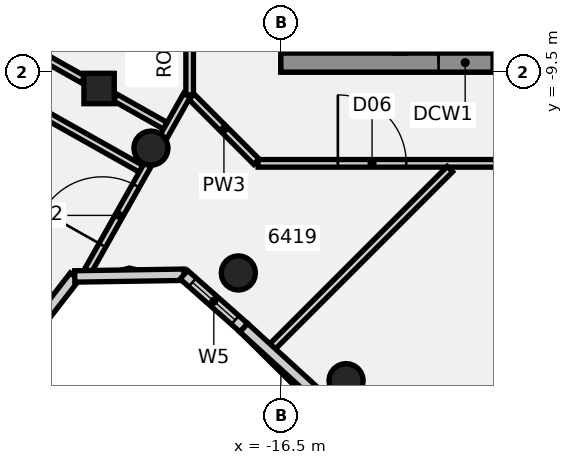
"""IFC4 building model, lengths in metres.
Left out: names, types, materials, properties, quantities, classifications, styles, units other than length and angle.
Written with IfcOpenShell. Run it as: python <this file> out.ifc"""

import sys

from ifc_helpers import new_model, si_unit, direction, frame, frame_2d, origin, origin_2d, place, context, subcontext, project, spatial, polyline, rectangle, circle, outline, extrude, element, fill, save


model = new_model("IFC4")
c1 = context("Model", 3, precision=1e-05, world=origin(), true_north=direction((0.0, 1.0)))
c2 = subcontext(c1, "Body", "Model", "MODEL_VIEW")
j1 = project(units=[si_unit("LENGTHUNIT", "METRE"), si_unit("PLANEANGLEUNIT", "RADIAN")], contexts=[c1])
p1 = place(None, origin())
s1 = spatial("IfcSite", under=j1, at=p1, CompositionType="ELEMENT")
p2 = place(p1, origin())
s2 = spatial("IfcBuilding", under=s1, at=p2, CompositionType="ELEMENT")
p3 = place(p2, frame((0.0, 0.0, 252.3)))
s3 = spatial("IfcBuildingStorey", under=s2, at=p3, CompositionType="ELEMENT", Elevation=252.3)
for number, where, z_axis, x_axis in (
    (1, (-19.919, -11.5, -0.18), (0.0, 0.0, 1.0), (1.0, 0.0, 0.0)),
    (2, (-17.619, -14.784, -0.18), (0.0, 0.0, 1.0), (1.0, 0.0, 0.0)),
    (3, (-14.784, -17.619, -0.18), (0.0, 0.0, 1.0), (1.0, 0.0, 0.0)),
):
    element("IfcColumn", number, at=place(p3, frame(where, z_axis=z_axis, x_axis=x_axis)), inside=s3, PredefinedType="COLUMN", context=c2, shape_type="SweptSolid", body=[
        extrude(circle(Radius=0.45, at=origin_2d()), origin(), (0.0, 0.0, 1.0), 4.54),
    ])
p4 = place(p3, frame((-21.283, -9.931, -0.165), z_axis=(0.0, 0.0, 1.0), x_axis=(0.490928082303, 0.871200102162, 0.0)))
e4 = element("IfcColumn", 4, at=p4, inside=s3, PredefinedType="COLUMN", context=c2, shape_type="SweptSolid", body=[
    extrude(rectangle(XDim=0.8, YDim=0.8, at=origin_2d()), origin(), (0.0, 0.0, 1.0), 4.415),
])
p5 = place(p3, frame((-18.854, -10.146, 0.0), z_axis=(0.0, 0.0, 1.0), x_axis=(0.707106781187, -0.707106781187, 0.0)))
e5 = element("IfcWall", 5, at=p5, inside=s3, PredefinedType="PARTITIONING", context=c2, shape_type="SweptSolid", body=[
    extrude(rectangle(XDim=2.421, YDim=0.2, at=frame_2d((1.21, 0.0))), origin(), (0.0, 0.0, 1.0), 3.66),
])
p6 = place(p3, frame((-27.723, -7.793, 0.0), z_axis=(0.0, 0.0, 1.0), x_axis=(0.871250853951, -0.490838007382, 0.0)))
e6 = element("IfcWall", 6, at=p6, inside=s3, PredefinedType="PARTITIONING", context=c2, shape_type="SweptSolid", body=[
    extrude(rectangle(XDim=8.66, YDim=0.2, at=frame_2d((4.33, 0.0))), origin(), (0.0, 0.0, 1.0), 3.65),
])
p7 = place(p3, frame((-26.711, -6.872, 0.0), z_axis=(0.0, 0.0, 1.0), x_axis=(0.871249420599, -0.490840551612, 0.0)))
e7 = element("IfcWall", 7, at=p7, inside=s3, PredefinedType="PARTITIONING", context=c2, shape_type="SweptSolid", body=[
    extrude(rectangle(XDim=5.741, YDim=0.2, at=frame_2d((2.871, 0.0))), origin(), (0.0, 0.0, 1.0), 3.65),
])
p8 = place(p3, frame((-20.857, -10.17, 0.0), z_axis=(0.0, 0.0, 1.0), x_axis=(0.871269034668, -0.490805734715, 0.0)))
e8 = element("IfcWall", 8, at=p8, inside=s3, PredefinedType="PARTITIONING", context=c2, shape_type="SweptSolid", body=[
    extrude(rectangle(XDim=1.511, YDim=0.2, at=frame_2d((0.756, 0.0))), origin(), (0.0, 0.0, 1.0), 3.66),
])
p9 = place(p3, frame((-17.1, -11.9, 0.0), z_axis=(0.0, 0.0, 1.0), x_axis=(1.0, 0.0, 0.0)))
e9 = element("IfcWall", 9, at=p9, inside=s3, PredefinedType="PARTITIONING", context=c2, shape_type="SweptSolid", body=[
    extrude(rectangle(XDim=34.145, YDim=0.2, at=frame_2d((17.073, 0.0))), origin(), (0.0, 0.0, 1.0), 3.66),
])
p10 = place(p9, frame((16.15, 0.0, 0.0)))
e10 = element("IfcOpeningElement", 10, at=p10, cuts=e9, PredefinedType="OPENING", context=c2, shape_type="SweptSolid", body=[
    extrude(rectangle(XDim=1.8, YDim=2.1, at=frame_2d((0.9, 1.05))), frame((0.0, 0.11, 0.0), z_axis=(0.0, -1.0, 0.0), x_axis=(1.0, 0.0, 0.0)), (0.0, 0.0, 1.0), 0.22),
])
p11 = place(p9, frame((7.45, 0.0, 0.0)))
e11 = element("IfcOpeningElement", 11, at=p11, cuts=e9, PredefinedType="OPENING", context=c2, shape_type="SweptSolid", body=[
    extrude(rectangle(XDim=1.8, YDim=2.1, at=frame_2d((0.9, 1.05))), frame((0.0, 0.11, 0.0), z_axis=(0.0, -1.0, 0.0), x_axis=(1.0, 0.0, 0.0)), (0.0, 0.0, 1.0), 0.22),
])
p12 = place(p9, frame((2.1, 0.0, 0.0)))
e12 = element("IfcOpeningElement", 12, at=p12, cuts=e9, PredefinedType="OPENING", context=c2, shape_type="SweptSolid", body=[
    extrude(rectangle(XDim=1.8, YDim=2.1, at=frame_2d((0.9, 1.05))), frame((0.0, 0.11, 0.0), z_axis=(0.0, -1.0, 0.0), x_axis=(1.0, 0.0, 0.0)), (0.0, 0.0, 1.0), 0.22),
])
p13 = place(p3, frame((-16.927, -16.927, 0.0), z_axis=(0.0, 0.0, 1.0), x_axis=(0.707106781187, 0.707106781187, 0.0)))
e13 = element("IfcWall", 13, at=p13, inside=s3, PredefinedType="PARTITIONING", context=c2, shape_type="SweptSolid", body=[
    extrude(rectangle(XDim=6.894, YDim=0.2, at=frame_2d((3.447, 0.0))), origin(), (0.0, 0.0, 1.0), 3.66),
])
p14 = place(p3, frame((-21.571, -14.72, 0.0), z_axis=(0.0, 0.0, 1.0), x_axis=(0.490968764071, 0.871177176415, 0.0)))
e14 = element("IfcWall", 14, at=p14, inside=s3, PredefinedType="PARTITIONING", context=c2, shape_type="SweptSolid", body=[
    extrude(rectangle(XDim=3.194, YDim=0.2, at=frame_2d((1.597, 0.0))), origin(), (0.0, 0.0, 1.0), 3.66),
])
p15 = place(p14, frame((0.764, 0.0, 0.0)))
e15 = element("IfcOpeningElement", 15, at=p15, cuts=e14, PredefinedType="OPENING", context=c2, shape_type="SweptSolid", body=[
    extrude(rectangle(XDim=1.8, YDim=2.1, at=frame_2d((0.9, 1.05))), frame((0.0, 0.11, 0.0), z_axis=(0.0, -1.0, 0.0), x_axis=(1.0, 0.0, 0.0)), (0.0, 0.0, 1.0), 0.22),
])
p16 = place(p3, frame((-19.588, -11.202, 0.0), z_axis=(0.0, 0.0, 1.0), x_axis=(0.490922315128, 0.871203351985, 0.0)))
e16 = element("IfcWall", 16, at=p16, inside=s3, PredefinedType="PARTITIONING", context=c2, shape_type="SweptSolid", body=[
    extrude(rectangle(XDim=1.262, YDim=0.2, at=frame_2d((0.631, 0.0))), origin(), (0.0, 0.0, 1.0), 3.66),
])
p17 = place(p3, frame((-18.9, -10.1, 0.0), z_axis=(0.0, 0.0, 1.0), x_axis=(0.0, 1.0, 0.0)))
e17 = element("IfcWall", 17, at=p17, inside=s3, PredefinedType="PARTITIONING", context=c2, shape_type="SweptSolid", body=[
    extrude(rectangle(XDim=20.2, YDim=0.2, at=frame_2d((10.1, 0.0))), origin(), (0.0, 0.0, 1.0), 3.66),
])
p18 = place(p17, frame((11.976, 0.0, 0.0)))
e18 = element("IfcOpeningElement", 18, at=p18, cuts=e17, PredefinedType="OPENING", context=c2, shape_type="SweptSolid", body=[
    extrude(rectangle(XDim=1.8, YDim=2.1, at=frame_2d((0.9, 1.05))), frame((0.0, 0.11, 0.0), z_axis=(0.0, -1.0, 0.0), x_axis=(1.0, 0.0, 0.0)), (0.0, 0.0, 1.0), 0.22),
])
p19 = place(p3, frame((-24.096, -17.673, 0.0), z_axis=(0.0, 0.0, 1.0), x_axis=(0.613382087815, 0.789786309294, 0.0)))
e19 = element("IfcWall", 19, at=p19, inside=s3, PredefinedType="SOLIDWALL", context=c2, shape_type="SweptSolid", body=[
    extrude(rectangle(XDim=3.542, YDim=0.3, at=frame_2d((1.771, 0.0))), origin(), (0.0, 0.0, 1.0), 4.36),
])
p20 = place(p3, frame((-21.924, -14.876, 0.0), z_axis=(0.0, 0.0, 1.0), x_axis=(0.999879048983, 0.015552729789, 0.0)))
e20 = element("IfcWall", 20, at=p20, inside=s3, PredefinedType="SOLIDWALL", context=c2, shape_type="SweptSolid", body=[
    extrude(rectangle(XDim=2.873, YDim=0.3, at=frame_2d((1.436, 0.0))), origin(), (0.0, 0.0, 1.0), 4.36),
])
p21 = place(p3, frame((-19.051, -14.832, 0.0), z_axis=(0.0, 0.0, 1.0), x_axis=(0.749217958037, -0.662323524688, 0.0)))
e21 = element("IfcWall", 21, at=p21, inside=s3, PredefinedType="SOLIDWALL", context=c2, shape_type="SweptSolid", body=[
    extrude(rectangle(XDim=2.104, YDim=0.3, at=frame_2d((1.052, 0.0))), origin(), (0.0, 0.0, 1.0), 4.36),
])
p22 = place(p21, frame((0.3, 0.0, 1.4)))
e22 = element("IfcOpeningElement", 22, at=p22, cuts=e21, PredefinedType="OPENING", context=c2, shape_type="SweptSolid", body=[
    extrude(rectangle(XDim=1.5, YDim=1.0, at=frame_2d((0.75, 0.5))), frame((0.0, 0.16, 0.0), z_axis=(0.0, -1.0, 0.0), x_axis=(1.0, 0.0, 0.0)), (0.0, 0.0, 1.0), 0.32),
])
p23 = place(p3, frame((-17.475, -16.225, 0.0), z_axis=(0.0, 0.0, 1.0), x_axis=(0.738631739758, -0.674109155124, 0.0)))
e23 = element("IfcWall", 23, at=p23, inside=s3, PredefinedType="SOLIDWALL", context=c2, shape_type="SweptSolid", body=[
    extrude(rectangle(XDim=3.939, YDim=0.3, at=frame_2d((1.969, 0.0))), origin(), (0.0, 0.0, 1.0), 4.36),
])
p24 = place(p3, frame((-16.5, -9.25, 0.0), z_axis=(0.0, 0.0, 1.0), x_axis=(1.0, 0.0, 0.0)))
e24 = element("IfcWall", 24, at=p24, inside=s3, PredefinedType="SHEAR", context=c2, shape_type="SweptSolid", body=[
    extrude(rectangle(XDim=13.0, YDim=0.5, at=frame_2d((6.5, 0.0))), origin(), (0.0, 0.0, 1.0), 4.36),
])
p25 = place(p24, frame((4.15, 0.0, 0.0)))
e25 = element("IfcOpeningElement", 25, at=p25, cuts=e24, PredefinedType="OPENING", context=c2, shape_type="SweptSolid", body=[
    extrude(rectangle(XDim=1.4, YDim=2.1, at=frame_2d((0.7, 1.05))), frame((0.0, 0.26, 0.0), z_axis=(0.0, -1.0, 0.0), x_axis=(1.0, 0.0, 0.0)), (0.0, 0.0, 1.0), 0.52),
])
p26 = place(p24, frame((10.125, 0.0, 0.0)))
e26 = element("IfcOpeningElement", 26, at=p26, cuts=e24, PredefinedType="OPENING", context=c2, shape_type="SweptSolid", body=[
    extrude(rectangle(XDim=1.4, YDim=2.1, at=frame_2d((0.7, 1.05))), frame((0.0, 0.26, 0.0), z_axis=(0.0, -1.0, 0.0), x_axis=(1.0, 0.0, 0.0)), (0.0, 0.0, 1.0), 0.52),
])
p27 = place(p3, origin())
e27 = element("IfcWall", 27, at=p27, inside=s3, PredefinedType="SHEAR", context=c2, shape_type="SweptSolid", body=[
    extrude(outline(polyline([(-13.5, -8.125), (-16.0, -8.125), (-16.0, -5.625), (-13.5, -5.625), (-13.5, -5.375), (-16.0, -5.375), (-16.0, 5.375), (-13.5, 5.375), (-13.5, 5.625), (-16.0, 5.625), (-16.0, 8.125), (-13.5, 8.125), (-13.5, 9.0), (-16.0, 9.0), (-16.5, 9.0), (-16.5, -9.0), (-16.0, -9.0), (-13.5, -9.0), (-13.5, -8.125)])), origin(), (0.0, 0.0, 1.0), 4.36),
])
p28 = place(p3, frame((-13.375, -9.0, 0.0), z_axis=(0.0, 0.0, 1.0), x_axis=(0.0, 1.0, 0.0)))
e28 = element("IfcWall", 28, at=p28, inside=s3, PredefinedType="SHEAR", context=c2, shape_type="SweptSolid", body=[
    extrude(rectangle(XDim=18.0, YDim=0.25, at=frame_2d((9.0, 0.0))), origin(), (0.0, 0.0, 1.0), 4.36),
])
p29 = place(p28, frame((1.425, 0.0, 0.0)))
e29 = element("IfcOpeningElement", 29, at=p29, cuts=e28, PredefinedType="OPENING", context=c2, shape_type="SweptSolid", body=[
    extrude(rectangle(XDim=1.4, YDim=2.1, at=frame_2d((0.7, 1.05))), frame((0.0, 0.135, 0.0), z_axis=(0.0, -1.0, 0.0), x_axis=(1.0, 0.0, 0.0)), (0.0, 0.0, 1.0), 0.27),
])
p30 = place(p28, frame((6.646, 0.0, 0.0)))
e30 = element("IfcOpeningElement", 30, at=p30, cuts=e28, PredefinedType="OPENING", context=c2, shape_type="SweptSolid", body=[
    extrude(rectangle(XDim=1.0, YDim=2.1, at=frame_2d((0.5, 1.05))), frame((0.0, 0.135, 0.0), z_axis=(0.0, -1.0, 0.0), x_axis=(1.0, 0.0, 0.0)), (0.0, 0.0, 1.0), 0.27),
])
p31 = place(p28, frame((12.146, 0.0, 0.0)))
e31 = element("IfcOpeningElement", 31, at=p31, cuts=e28, PredefinedType="OPENING", context=c2, shape_type="SweptSolid", body=[
    extrude(rectangle(XDim=1.0, YDim=2.1, at=frame_2d((0.5, 1.05))), frame((0.0, 0.135, 0.0), z_axis=(0.0, -1.0, 0.0), x_axis=(1.0, 0.0, 0.0)), (0.0, 0.0, 1.0), 0.27),
])
p32 = place(p12, frame((1.8, 0.0, 0.0), z_axis=(0.0, 0.0, 1.0), x_axis=(-1.0, 0.0, 0.0)))
e32 = element("IfcDoor", 32, at=p32, inside=s3, OperationType="DOUBLE_DOOR_SINGLE_SWING", PredefinedType="DOOR", context=c2, shape_type="SweptSolid", body=[
    extrude(rectangle(XDim=1.8, YDim=2.1, at=frame_2d((0.9, 1.05))), frame((0.0, 0.025, 0.0), z_axis=(0.0, -1.0, 0.0), x_axis=(1.0, 0.0, 0.0)), (0.0, 0.0, 1.0), 0.05),
])
fill(e12, e32)
p33 = place(p15, origin())
e33 = element("IfcDoor", 33, at=p33, inside=s3, OperationType="DOUBLE_DOOR_SINGLE_SWING", PredefinedType="DOOR", context=c2, shape_type="SweptSolid", body=[
    extrude(rectangle(XDim=1.8, YDim=2.1, at=frame_2d((0.9, 1.05))), frame((0.0, 0.025, 0.0), z_axis=(0.0, -1.0, 0.0), x_axis=(1.0, 0.0, 0.0)), (0.0, 0.0, 1.0), 0.05),
])
fill(e15, e33)
p34 = place(p22, origin())
e34 = element("IfcWindow", 34, at=p34, inside=s3, PartitioningType="SINGLE_PANEL", PredefinedType="WINDOW", context=c2, shape_type="SweptSolid", body=[
    extrude(rectangle(XDim=1.5, YDim=1.0, at=frame_2d((0.75, 0.5))), frame((0.0, 0.03, 0.0), z_axis=(0.0, -1.0, 0.0), x_axis=(1.0, 0.0, 0.0)), (0.0, 0.0, 1.0), 0.06),
])
fill(e22, e34)
p35 = place(p25, origin())
e35 = element("IfcDoor", 35, at=p35, inside=s3, OperationType="SINGLE_SWING_LEFT", PredefinedType="DOOR", context=c2, shape_type="SweptSolid", body=[
    extrude(rectangle(XDim=1.4, YDim=2.1, at=frame_2d((0.7, 1.05))), frame((0.0, 0.025, 0.0), z_axis=(0.0, -1.0, 0.0), x_axis=(1.0, 0.0, 0.0)), (0.0, 0.0, 1.0), 0.05),
])
fill(e25, e35)
save(model, sys.argv[1])
